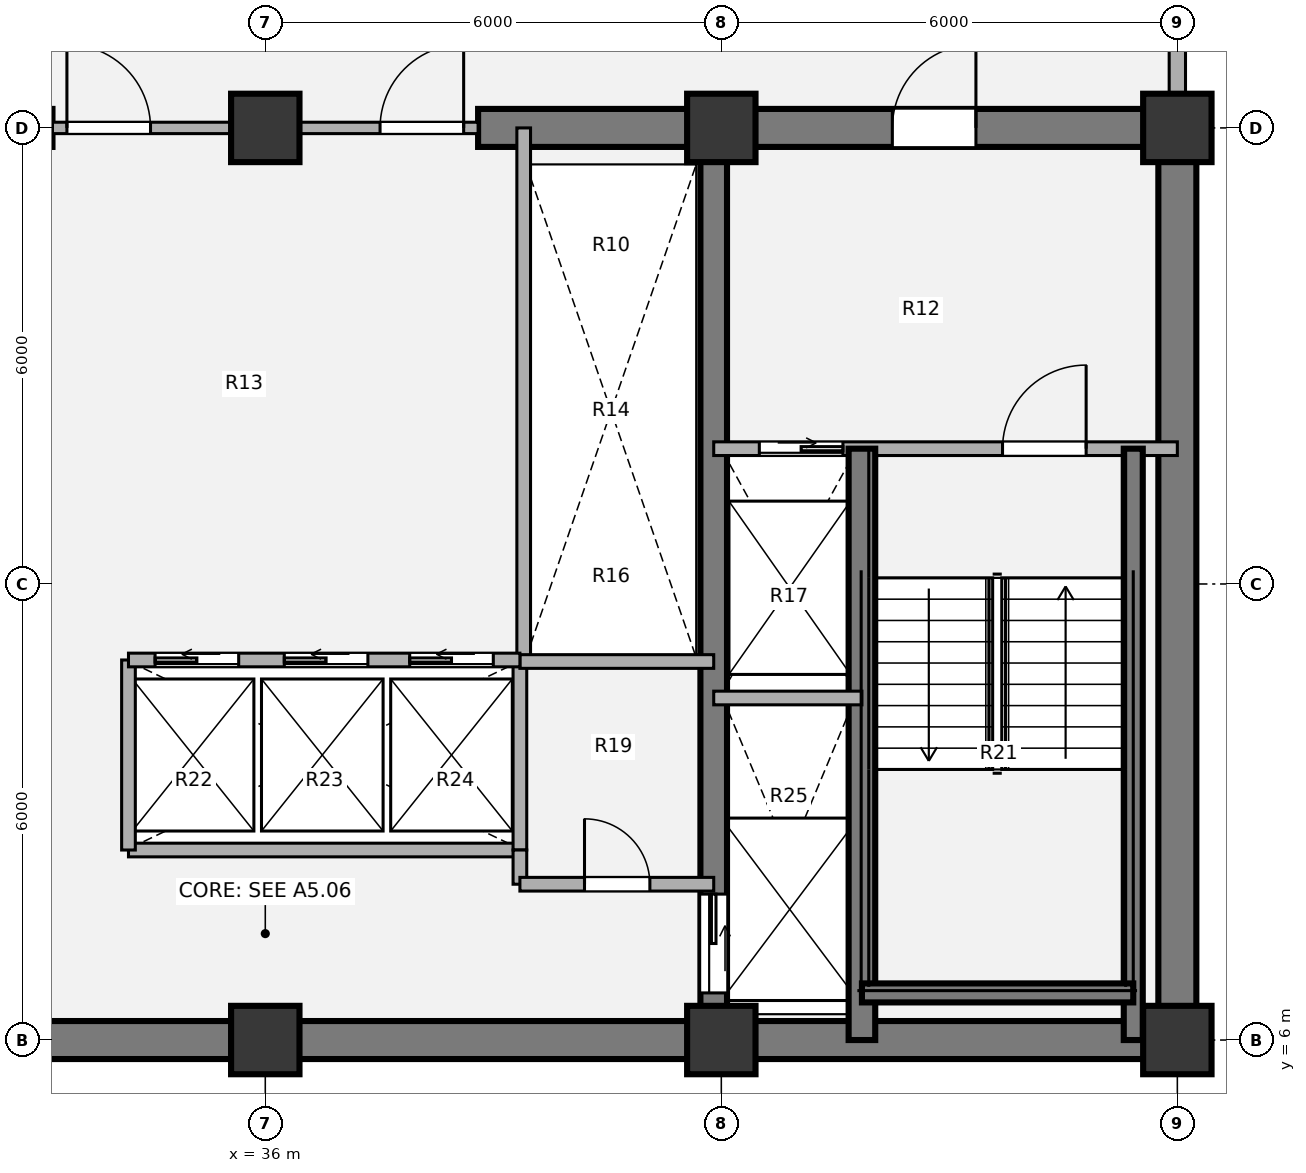
"""IFC4 building model, lengths in metres.
Left out: names, types, materials, properties, quantities, classifications, styles, units other than length and angle.
Written with IfcOpenShell. Run it as: python <this file> out.ifc"""

import sys

from ifc_helpers import new_model, si_unit, direction, frame, frame_2d, origin, origin_2d, place, context, subcontext, project, spatial, rectangle, extrude, source, transform, mapped, element, fill, save


model = new_model("IFC4")
c1 = context("Model", 3, precision=1e-05, world=origin(), true_north=direction((0.0, 1.0)))
c2 = subcontext(c1, "Body", "Model", "MODEL_VIEW")
j1 = project(units=[si_unit("LENGTHUNIT", "METRE"), si_unit("PLANEANGLEUNIT", "RADIAN")], contexts=[c1])
p1 = place(None, origin())
s1 = spatial("IfcSite", under=j1, at=p1, CompositionType="ELEMENT")
p2 = place(p1, origin())
s2 = spatial("IfcBuilding", under=s1, at=p2, CompositionType="ELEMENT")
p3 = place(p2, frame((0.0, 0.0, 112.5)))
s3 = spatial("IfcBuildingStorey", under=s2, at=p3, CompositionType="ELEMENT", Elevation=112.5)
m1 = source(origin(), c2, "Body", "SweptSolid", [
    extrude(rectangle(XDim=0.9, YDim=0.9, at=origin_2d()), origin(), (0.0, 0.0, 1.0), 3.78),
])
for number, where, z_axis, x_axis in (
    (1, (36.0, 6.0, 0.0), (0.0, 0.0, 1.0), (1.0, 0.0, 0.0)),
    (2, (42.0, 6.0, 0.0), (0.0, 0.0, 1.0), (1.0, 0.0, 0.0)),
    (3, (48.0, 6.0, 0.0), (0.0, 0.0, 1.0), (1.0, 0.0, 0.0)),
    (4, (36.0, 18.0, 0.0), (0.0, 0.0, 1.0), (1.0, 0.0, 0.0)),
    (5, (42.0, 18.0, 0.0), (0.0, 0.0, 1.0), (1.0, 0.0, 0.0)),
    (6, (48.0, 18.0, 0.0), (0.0, 0.0, 1.0), (1.0, 0.0, 0.0)),
):
    element("IfcColumn", number, at=place(p3, frame(where, z_axis=z_axis, x_axis=x_axis)), inside=s3, PredefinedType="COLUMN", context=c2, shape_type="MappedRepresentation", body=[
        mapped(m1, transform((0.0, 0.0, 0.0), x_axis=(1.0, 0.0, 0.0), y_axis=(0.0, 1.0, 0.0), z_axis=(0.0, 0.0, 1.0), scale=1.0)),
    ])
p4 = place(p3, frame((48.25, 6.0, 0.0), z_axis=(0.0, 0.0, 1.0), x_axis=(-1.0, 0.0, 0.0)))
e7 = element("IfcWall", 7, at=p4, inside=s3, PredefinedType="SHEAR", context=c2, shape_type="SweptSolid", body=[
    extrude(rectangle(XDim=24.5, YDim=0.5, at=frame_2d((12.25, 0.0))), origin(), (0.0, 0.0, 1.0), 3.78),
])
p5 = place(p3, frame((48.0, 18.0, 0.0), z_axis=(0.0, 0.0, 1.0), x_axis=(0.0, -1.0, 0.0)))
e8 = element("IfcWall", 8, at=p5, inside=s3, PredefinedType="SHEAR", context=c2, shape_type="SweptSolid", body=[
    extrude(rectangle(XDim=12.0, YDim=0.5, at=frame_2d((6.0, 0.0))), origin(), (0.0, 0.0, 1.0), 3.78),
])
p6 = place(p3, frame((23.75, 18.0, 0.0), z_axis=(0.0, 0.0, 1.0), x_axis=(1.0, 0.0, 0.0)))
e9 = element("IfcWall", 9, at=p6, inside=s3, PredefinedType="SHEAR", context=c2, shape_type="SweptSolid", body=[
    extrude(rectangle(XDim=9.45, YDim=0.5, at=frame_2d((4.725, 0.0))), origin(), (0.0, 0.0, 1.0), 3.78),
])
p7 = place(p6, frame((2.95, 0.0, 0.0)))
e10 = element("IfcOpeningElement", 10, at=p7, cuts=e9, PredefinedType="OPENING", context=c2, shape_type="SweptSolid", body=[
    extrude(rectangle(XDim=1.1, YDim=2.1, at=origin_2d()), frame((0.55, 0.26, 1.05), z_axis=(0.0, -1.0, 0.0), x_axis=(1.0, 0.0, 0.0)), (0.0, 0.0, 1.0), 0.52),
])
p8 = place(p3, frame((38.8, 18.0, 0.0), z_axis=(0.0, 0.0, 1.0), x_axis=(1.0, 0.0, 0.0)))
e11 = element("IfcWall", 11, at=p8, inside=s3, PredefinedType="SHEAR", context=c2, shape_type="SweptSolid", body=[
    extrude(rectangle(XDim=9.45, YDim=0.5, at=frame_2d((4.725, 0.0))), origin(), (0.0, 0.0, 1.0), 3.78),
])
p9 = place(p8, frame((5.45, 0.0, 0.0)))
e12 = element("IfcOpeningElement", 12, at=p9, cuts=e11, PredefinedType="OPENING", context=c2, shape_type="SweptSolid", body=[
    extrude(rectangle(XDim=1.1, YDim=2.1, at=origin_2d()), frame((0.55, 0.26, 1.05), z_axis=(0.0, -1.0, 0.0), x_axis=(1.0, 0.0, 0.0)), (0.0, 0.0, 1.0), 0.52),
])
p10 = place(p3, frame((41.9, 18.0, 0.0), z_axis=(0.0, 0.0, 1.0), x_axis=(0.0, -1.0, 0.0)))
e13 = element("IfcWall", 13, at=p10, inside=s3, PredefinedType="SHEAR", context=c2, shape_type="SweptSolid", body=[
    extrude(rectangle(XDim=12.0, YDim=0.35, at=frame_2d((6.0, 0.0))), origin(), (0.0, 0.0, 1.0), 3.78),
])
p11 = place(p10, frame((10.08, 0.0, 0.0)))
e14 = element("IfcOpeningElement", 14, at=p11, cuts=e13, PredefinedType="OPENING", context=c2, shape_type="SweptSolid", body=[
    extrude(rectangle(XDim=1.3, YDim=2.1, at=origin_2d()), frame((0.65, 0.185, 1.05), z_axis=(0.0, -1.0, 0.0), x_axis=(1.0, 0.0, 0.0)), (0.0, 0.0, 1.0), 0.37),
])
p12 = place(p3, frame((48.0, 21.05, 0.0), z_axis=(0.0, 0.0, 1.0), x_axis=(0.0, -1.0, 0.0)))
e15 = element("IfcWall", 15, at=p12, inside=s3, PredefinedType="SOLIDWALL", context=c2, shape_type="SweptSolid", body=[
    extrude(rectangle(XDim=2.62, YDim=0.215, at=frame_2d((1.31, 0.0))), origin(), (0.0, 0.0, 1.0), 3.53),
])
p13 = place(p3, frame((34.2, 8.5, 0.0), z_axis=(0.0, 0.0, 1.0), x_axis=(1.0, 0.0, 0.0)))
e16 = element("IfcWall", 16, at=p13, inside=s3, PredefinedType="PARTITIONING", context=c2, shape_type="SweptSolid", body=[
    extrude(rectangle(XDim=5.15, YDim=0.18, at=frame_2d((2.575, 0.0))), origin(), (0.0, 0.0, 1.0), 3.5),
])
for number, where, z_axis, x_axis in (
    (17, (34.2, 8.5, 0.0), (0.0, 0.0, 1.0), (0.0, 1.0, 0.0)),
    (18, (39.35, 8.5, 0.0), (0.0, 0.0, 1.0), (0.0, 1.0, 0.0)),
):
    element("IfcWall", number, at=place(p3, frame(where, z_axis=z_axis, x_axis=x_axis)), inside=s3, PredefinedType="PARTITIONING", context=c2, shape_type="SweptSolid", body=[
        extrude(rectangle(XDim=2.5, YDim=0.18, at=frame_2d((1.25, 0.0))), origin(), (0.0, 0.0, 1.0), 3.5),
    ])
p14 = place(p3, frame((39.4, 11.0, 0.0), z_axis=(0.0, 0.0, 1.0), x_axis=(0.0, 1.0, 0.0)))
e19 = element("IfcWall", 19, at=p14, inside=s3, PredefinedType="PARTITIONING", context=c2, shape_type="SweptSolid", body=[
    extrude(rectangle(XDim=7.0, YDim=0.18, at=frame_2d((3.5, 0.0))), origin(), (0.0, 0.0, 1.0), 3.5),
])
p15 = place(p3, frame((39.35, 10.98, 0.0), z_axis=(0.0, 0.0, 1.0), x_axis=(1.0, 0.0, 0.0)))
e20 = element("IfcWall", 20, at=p15, inside=s3, PredefinedType="PARTITIONING", context=c2, shape_type="SweptSolid", body=[
    extrude(rectangle(XDim=2.55, YDim=0.18, at=frame_2d((1.275, 0.0))), origin(), (0.0, 0.0, 1.0), 3.5),
])
p16 = place(p3, frame((39.35, 8.05, 0.0), z_axis=(0.0, 0.0, 1.0), x_axis=(0.0, 1.0, 0.0)))
e21 = element("IfcWall", 21, at=p16, inside=s3, PredefinedType="PARTITIONING", context=c2, shape_type="SweptSolid", body=[
    extrude(rectangle(XDim=0.45, YDim=0.18, at=frame_2d((0.225, 0.0))), origin(), (0.0, 0.0, 1.0), 3.5),
])
p17 = place(p3, frame((39.35, 8.05, 0.0), z_axis=(0.0, 0.0, 1.0), x_axis=(1.0, 0.0, 0.0)))
e22 = element("IfcWall", 22, at=p17, inside=s3, PredefinedType="PARTITIONING", context=c2, shape_type="SweptSolid", body=[
    extrude(rectangle(XDim=2.55, YDim=0.18, at=frame_2d((1.275, 0.0))), origin(), (0.0, 0.0, 1.0), 3.5),
])
p18 = place(p17, frame((0.85, 0.0, 0.0)))
e23 = element("IfcOpeningElement", 23, at=p18, cuts=e22, PredefinedType="OPENING", context=c2, shape_type="SweptSolid", body=[
    extrude(rectangle(XDim=0.86, YDim=2.1, at=origin_2d()), frame((0.43, 0.1, 1.05), z_axis=(0.0, -1.0, 0.0), x_axis=(1.0, 0.0, 0.0)), (0.0, 0.0, 1.0), 0.2),
])
p19 = place(p3, frame((33.2, 18.0, 0.0), z_axis=(0.0, 0.0, 1.0), x_axis=(1.0, 0.0, 0.0)))
e24 = element("IfcWall", 24, at=p19, inside=s3, PredefinedType="PARTITIONING", context=c2, shape_type="SweptSolid", body=[
    extrude(rectangle(XDim=5.6, YDim=0.15, at=frame_2d((2.8, 0.0))), origin(), (0.0, 0.0, 1.0), 2.315),
])
p20 = place(p19, frame((0.19, 0.0, 0.0)))
e25 = element("IfcOpeningElement", 25, at=p20, cuts=e24, PredefinedType="OPENING", context=c2, shape_type="SweptSolid", body=[
    extrude(rectangle(XDim=1.1, YDim=2.1, at=origin_2d()), frame((0.55, 0.085, 1.05), z_axis=(0.0, -1.0, 0.0), x_axis=(1.0, 0.0, 0.0)), (0.0, 0.0, 1.0), 0.17),
])
p21 = place(p19, frame((4.31, 0.0, 0.0)))
e26 = element("IfcOpeningElement", 26, at=p21, cuts=e24, PredefinedType="OPENING", context=c2, shape_type="SweptSolid", body=[
    extrude(rectangle(XDim=1.1, YDim=2.1, at=origin_2d()), frame((0.55, 0.085, 1.05), z_axis=(0.0, -1.0, 0.0), x_axis=(1.0, 0.0, 0.0)), (0.0, 0.0, 1.0), 0.17),
])
p22 = place(p3, frame((41.9, 13.78, 0.0), z_axis=(0.0, 0.0, 1.0), x_axis=(1.0, 0.0, 0.0)))
e27 = element("IfcWall", 27, at=p22, inside=s3, PredefinedType="PARTITIONING", context=c2, shape_type="SweptSolid", body=[
    extrude(rectangle(XDim=6.1, YDim=0.18, at=frame_2d((3.05, 0.0))), origin(), (0.0, 0.0, 1.0), 3.5),
])
p23 = place(p22, frame((0.6, 0.0, 0.0)))
e28 = element("IfcOpeningElement", 28, at=p23, cuts=e27, PredefinedType="OPENING", context=c2, shape_type="SweptSolid", body=[
    extrude(rectangle(XDim=1.1, YDim=2.1, at=origin_2d()), frame((0.55, 0.1, 1.05), z_axis=(0.0, -1.0, 0.0), x_axis=(1.0, 0.0, 0.0)), (0.0, 0.0, 1.0), 0.2),
])
p24 = place(p22, frame((3.8, 0.0, 0.0)))
e29 = element("IfcOpeningElement", 29, at=p24, cuts=e27, PredefinedType="OPENING", context=c2, shape_type="SweptSolid", body=[
    extrude(rectangle(XDim=1.1, YDim=2.1, at=origin_2d()), frame((0.55, 0.1, 1.05), z_axis=(0.0, -1.0, 0.0), x_axis=(1.0, 0.0, 0.0)), (0.0, 0.0, 1.0), 0.2),
])
p25 = place(p3, frame((43.85, 6.0, 0.0), z_axis=(0.0, 0.0, 1.0), x_axis=(0.0, 1.0, 0.0)))
e30 = element("IfcWall", 30, at=p25, inside=s3, PredefinedType="SHEAR", context=c2, shape_type="SweptSolid", body=[
    extrude(rectangle(XDim=7.78, YDim=0.35, at=frame_2d((3.89, 0.0))), origin(), (0.0, 0.0, 1.0), 3.85),
])
p26 = place(p3, frame((47.42, 6.0, 0.0), z_axis=(0.0, 0.0, 1.0), x_axis=(0.0, 1.0, 0.0)))
e31 = element("IfcWall", 31, at=p26, inside=s3, PredefinedType="SHEAR", context=c2, shape_type="SweptSolid", body=[
    extrude(rectangle(XDim=7.78, YDim=0.25, at=frame_2d((3.89, 0.0))), origin(), (0.0, 0.0, 1.0), 3.85),
])
p27 = place(p3, frame((43.85, 6.62, 0.0), z_axis=(0.0, 0.0, 1.0), x_axis=(1.0, 0.0, 0.0)))
e32 = element("IfcWall", 32, at=p27, inside=s3, PredefinedType="SHEAR", context=c2, shape_type="SweptSolid", body=[
    extrude(rectangle(XDim=3.57, YDim=0.25, at=frame_2d((1.785, 0.0))), origin(), (0.0, 0.0, 1.0), 3.85),
])
p28 = place(p3, frame((41.9, 10.5, 0.0), z_axis=(0.0, 0.0, 1.0), x_axis=(1.0, 0.0, 0.0)))
e33 = element("IfcWall", 33, at=p28, inside=s3, PredefinedType="PARTITIONING", context=c2, shape_type="SweptSolid", body=[
    extrude(rectangle(XDim=1.95, YDim=0.18, at=frame_2d((0.975, 0.0))), origin(), (0.0, 0.0, 1.0), 3.5),
])
p29 = place(p3, frame((34.2, 11.0, 0.0), z_axis=(0.0, 0.0, 1.0), x_axis=(1.0, 0.0, 0.0)))
e34 = element("IfcWall", 34, at=p29, inside=s3, PredefinedType="PARTITIONING", context=c2, shape_type="SweptSolid", body=[
    extrude(rectangle(XDim=5.15, YDim=0.18, at=frame_2d((2.575, 0.0))), origin(), (0.0, 0.0, 1.0), 3.5),
])
p30 = place(p29, frame((0.35, 0.0, 0.0)))
e35 = element("IfcOpeningElement", 35, at=p30, cuts=e34, PredefinedType="OPENING", context=c2, shape_type="SweptSolid", body=[
    extrude(rectangle(XDim=1.1, YDim=2.1, at=origin_2d()), frame((0.55, 0.1, 1.05), z_axis=(0.0, -1.0, 0.0), x_axis=(1.0, 0.0, 0.0)), (0.0, 0.0, 1.0), 0.2),
])
p31 = place(p29, frame((2.05, 0.0, 0.0)))
e36 = element("IfcOpeningElement", 36, at=p31, cuts=e34, PredefinedType="OPENING", context=c2, shape_type="SweptSolid", body=[
    extrude(rectangle(XDim=1.1, YDim=2.1, at=origin_2d()), frame((0.55, 0.1, 1.05), z_axis=(0.0, -1.0, 0.0), x_axis=(1.0, 0.0, 0.0)), (0.0, 0.0, 1.0), 0.2),
])
p32 = place(p29, frame((3.7, 0.0, 0.0)))
e37 = element("IfcOpeningElement", 37, at=p32, cuts=e34, PredefinedType="OPENING", context=c2, shape_type="SweptSolid", body=[
    extrude(rectangle(XDim=1.1, YDim=2.1, at=origin_2d()), frame((0.55, 0.1, 1.05), z_axis=(0.0, -1.0, 0.0), x_axis=(1.0, 0.0, 0.0)), (0.0, 0.0, 1.0), 0.2),
])
m2 = source(origin(), c2, "Body", "SweptSolid", [
    extrude(rectangle(XDim=0.86, YDim=2.1, at=origin_2d()), frame((0.43, 0.025, 1.05), z_axis=(0.0, -1.0, 0.0), x_axis=(1.0, 0.0, 0.0)), (0.0, 0.0, 1.0), 0.05),
])
p33 = place(p18, origin())
e38 = element("IfcDoor", 38, at=p33, inside=s3, OperationType="SINGLE_SWING_LEFT", PredefinedType="DOOR", context=c2, shape_type="MappedRepresentation", body=[
    mapped(m2, transform((0.0, 0.0, 0.0), x_axis=(1.0, 0.0, 0.0), y_axis=(0.0, 1.0, 0.0), z_axis=(0.0, 0.0, 1.0), scale=1.0)),
])
fill(e23, e38)
m3 = source(origin(), c2, "Body", "SweptSolid", [
    extrude(rectangle(XDim=1.1, YDim=2.1, at=origin_2d()), frame((0.55, 0.025, 1.05), z_axis=(0.0, -1.0, 0.0), x_axis=(1.0, 0.0, 0.0)), (0.0, 0.0, 1.0), 0.05),
])
p34 = place(p20, origin())
e39 = element("IfcDoor", 39, at=p34, inside=s3, OperationType="SINGLE_SWING_LEFT", PredefinedType="DOOR", context=c2, shape_type="MappedRepresentation", body=[
    mapped(m3, transform((0.0, 0.0, 0.0), x_axis=(1.0, 0.0, 0.0), y_axis=(0.0, 1.0, 0.0), z_axis=(0.0, 0.0, 1.0), scale=1.0)),
])
fill(e25, e39)
p35 = place(p21, origin())
e40 = element("IfcDoor", 40, at=p35, inside=s3, OperationType="SINGLE_SWING_RIGHT", PredefinedType="DOOR", context=c2, shape_type="MappedRepresentation", body=[
    mapped(m3, transform((0.0, 0.0, 0.0), x_axis=(1.0, 0.0, 0.0), y_axis=(0.0, 1.0, 0.0), z_axis=(0.0, 0.0, 1.0), scale=1.0)),
])
fill(e26, e40)
m4 = source(origin(), c2, "Body", "SweptSolid", [
    extrude(rectangle(XDim=1.1, YDim=2.1, at=origin_2d()), frame((0.55, 0.025, 1.05), z_axis=(0.0, -1.0, 0.0), x_axis=(1.0, 0.0, 0.0)), (0.0, 0.0, 1.0), 0.05),
])
p36 = place(p23, origin())
e41 = element("IfcDoor", 41, at=p36, inside=s3, OperationType="SLIDING_TO_RIGHT", PredefinedType="DOOR", context=c2, shape_type="MappedRepresentation", body=[
    mapped(m4, transform((0.0, 0.0, 0.0), x_axis=(1.0, 0.0, 0.0), y_axis=(0.0, 1.0, 0.0), z_axis=(0.0, 0.0, 1.0), scale=1.0)),
])
fill(e28, e41)
m5 = source(origin(), c2, "Body", "SweptSolid", [
    extrude(rectangle(XDim=1.1, YDim=2.1, at=origin_2d()), frame((0.55, 0.025, 1.05), z_axis=(0.0, -1.0, 0.0), x_axis=(1.0, 0.0, 0.0)), (0.0, 0.0, 1.0), 0.05),
])
p37 = place(p24, origin())
e42 = element("IfcDoor", 42, at=p37, inside=s3, OperationType="SINGLE_SWING_RIGHT", PredefinedType="DOOR", context=c2, shape_type="MappedRepresentation", body=[
    mapped(m5, transform((0.0, 0.0, 0.0), x_axis=(1.0, 0.0, 0.0), y_axis=(0.0, 1.0, 0.0), z_axis=(0.0, 0.0, 1.0), scale=1.0)),
])
fill(e29, e42)
m6 = source(origin(), c2, "Body", "SweptSolid", [
    extrude(rectangle(XDim=1.3, YDim=2.1, at=origin_2d()), frame((0.65, 0.025, 1.05), z_axis=(0.0, -1.0, 0.0), x_axis=(1.0, 0.0, 0.0)), (0.0, 0.0, 1.0), 0.05),
])
p38 = place(p11, origin())
e43 = element("IfcDoor", 43, at=p38, inside=s3, OperationType="SLIDING_TO_LEFT", PredefinedType="DOOR", context=c2, shape_type="MappedRepresentation", body=[
    mapped(m6, transform((0.0, 0.0, 0.0), x_axis=(1.0, 0.0, 0.0), y_axis=(0.0, 1.0, 0.0), z_axis=(0.0, 0.0, 1.0), scale=1.0)),
])
fill(e14, e43)
p39 = place(p9, origin())
e44 = element("IfcDoor", 44, at=p39, inside=s3, OperationType="SINGLE_SWING_RIGHT", PredefinedType="DOOR", context=c2, shape_type="MappedRepresentation", body=[
    mapped(m3, transform((0.0, 0.0, 0.0), x_axis=(1.0, 0.0, 0.0), y_axis=(0.0, 1.0, 0.0), z_axis=(0.0, 0.0, 1.0), scale=1.0)),
])
fill(e12, e44)
p40 = place(p30, origin())
e45 = element("IfcDoor", 45, at=p40, inside=s3, OperationType="SLIDING_TO_LEFT", PredefinedType="DOOR", context=c2, shape_type="MappedRepresentation", body=[
    mapped(m4, transform((0.0, 0.0, 0.0), x_axis=(1.0, 0.0, 0.0), y_axis=(0.0, 1.0, 0.0), z_axis=(0.0, 0.0, 1.0), scale=1.0)),
])
fill(e35, e45)
p41 = place(p31, origin())
e46 = element("IfcDoor", 46, at=p41, inside=s3, OperationType="SLIDING_TO_LEFT", PredefinedType="DOOR", context=c2, shape_type="MappedRepresentation", body=[
    mapped(m4, transform((0.0, 0.0, 0.0), x_axis=(1.0, 0.0, 0.0), y_axis=(0.0, 1.0, 0.0), z_axis=(0.0, 0.0, 1.0), scale=1.0)),
])
fill(e36, e46)
p42 = place(p32, origin())
e47 = element("IfcDoor", 47, at=p42, inside=s3, OperationType="SLIDING_TO_LEFT", PredefinedType="DOOR", context=c2, shape_type="MappedRepresentation", body=[
    mapped(m4, transform((0.0, 0.0, 0.0), x_axis=(1.0, 0.0, 0.0), y_axis=(0.0, 1.0, 0.0), z_axis=(0.0, 0.0, 1.0), scale=1.0)),
])
fill(e37, e47)
save(model, sys.argv[1])
